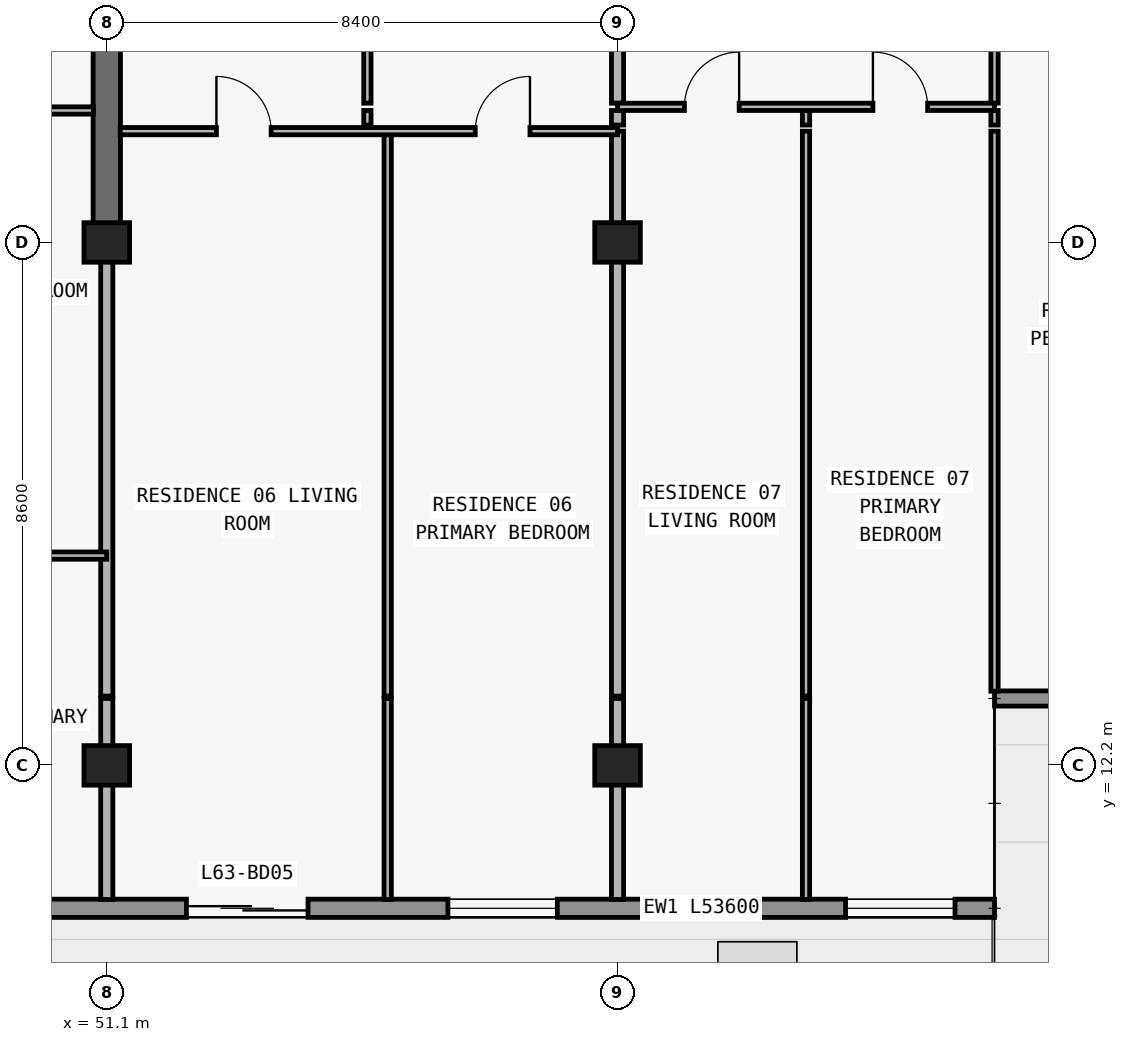
"""IFC4 building model, lengths in metres.
Left out: names, types, materials, properties, quantities, classifications, styles, units other than length and angle.
Written with IfcOpenShell. Run it as: python <this file> out.ifc"""

import sys

from ifc_helpers import new_model, si_unit, direction, frame, frame_2d, origin, origin_2d, place, context, subcontext, project, spatial, rectangle, extrude, element, fill, save


model = new_model("IFC4")
c1 = context("Model", 3, precision=1e-05, world=origin(), true_north=direction((0.0, 1.0)))
c2 = subcontext(c1, "Body", "Model", "MODEL_VIEW")
j1 = project(units=[si_unit("LENGTHUNIT", "METRE"), si_unit("PLANEANGLEUNIT", "RADIAN")], contexts=[c1])
p1 = place(None, origin())
s1 = spatial("IfcSite", under=j1, at=p1, CompositionType="ELEMENT")
p2 = place(p1, origin())
s2 = spatial("IfcBuilding", under=s1, at=p2, CompositionType="ELEMENT")
p3 = place(p2, frame((0.0, 0.0, 226.5)))
s3 = spatial("IfcBuildingStorey", under=s2, at=p3, CompositionType="ELEMENT", Elevation=226.5)
for number, where, z_axis, x_axis in (
    (1, (51.1, 12.2, 0.0), (0.0, 0.0, 1.0), (1.0, 0.0, 0.0)),
    (2, (59.5, 12.2, 0.0), (0.0, 0.0, 1.0), (1.0, 0.0, 0.0)),
    (3, (51.1, 20.8, 0.0), (0.0, 0.0, 1.0), (1.0, 0.0, 0.0)),
    (4, (59.5, 20.8, 0.0), (0.0, 0.0, 1.0), (1.0, 0.0, 0.0)),
):
    element("IfcColumn", number, at=place(p3, frame(where, z_axis=z_axis, x_axis=x_axis)), inside=s3, PredefinedType="COLUMN", context=c2, shape_type="SweptSolid", body=[
        extrude(rectangle(XDim=0.75, YDim=0.65, at=origin_2d()), origin(), (0.0, 0.0, 1.0), 3.05),
    ])
p4 = place(p3, frame((51.1, 20.8, 0.0), z_axis=(0.0, 0.0, 1.0), x_axis=(0.0, 1.0, 0.0)))
e5 = element("IfcWall", 5, at=p4, inside=s3, PredefinedType="SHEAR", context=c2, shape_type="SweptSolid", body=[
    extrude(rectangle(XDim=8.6, YDim=0.45, at=frame_2d((4.3, 0.0))), origin(), (0.0, 0.0, 1.0), 3.05),
])
p5 = place(p3, frame((65.7, 9.85, 0.0), z_axis=(0.0, 0.0, 1.0), x_axis=(-1.0, 0.0, 0.0)))
e6 = element("IfcWall", 6, at=p5, inside=s3, PredefinedType="STANDARD", context=c2, shape_type="SweptSolid", body=[
    extrude(rectangle(XDim=53.6, YDim=0.3, at=frame_2d((26.8, 0.0))), origin(), (0.0, 0.0, 1.0), 3.05),
])
p6 = place(p5, frame((48.05, 0.0, 0.85)))
e7 = element("IfcOpeningElement", 7, at=p6, cuts=e6, PredefinedType="OPENING", context=c2, shape_type="SweptSolid", body=[
    extrude(rectangle(XDim=1.8, YDim=1.55, at=frame_2d((0.9, 0.775))), frame((0.0, 0.16, 0.0), z_axis=(0.0, -1.0, 0.0), x_axis=(1.0, 0.0, 0.0)), (0.0, 0.0, 1.0), 0.32),
])
p7 = place(p5, frame((44.09, 0.0, 0.0)))
e8 = element("IfcOpeningElement", 8, at=p7, cuts=e6, PredefinedType="OPENING", context=c2, shape_type="SweptSolid", body=[
    extrude(rectangle(XDim=2.0, YDim=2.3, at=frame_2d((1.0, 1.15))), frame((0.0, 0.16, 0.0), z_axis=(0.0, -1.0, 0.0), x_axis=(1.0, 0.0, 0.0)), (0.0, 0.0, 1.0), 0.32),
])
p8 = place(p5, frame((39.99, 0.0, 0.85)))
e9 = element("IfcOpeningElement", 9, at=p8, cuts=e6, PredefinedType="OPENING", context=c2, shape_type="SweptSolid", body=[
    extrude(rectangle(XDim=1.8, YDim=1.55, at=frame_2d((0.9, 0.775))), frame((0.0, 0.16, 0.0), z_axis=(0.0, -1.0, 0.0), x_axis=(1.0, 0.0, 0.0)), (0.0, 0.0, 1.0), 0.32),
])
p9 = place(p5, frame((36.026, 0.0, 0.0)))
e10 = element("IfcOpeningElement", 10, at=p9, cuts=e6, PredefinedType="OPENING", context=c2, shape_type="SweptSolid", body=[
    extrude(rectangle(XDim=2.0, YDim=2.3, at=frame_2d((1.0, 1.15))), frame((0.0, 0.16, 0.0), z_axis=(0.0, -1.0, 0.0), x_axis=(1.0, 0.0, 0.0)), (0.0, 0.0, 1.0), 0.32),
])
p10 = place(p5, frame((31.726, 0.0, 0.85)))
e11 = element("IfcOpeningElement", 11, at=p10, cuts=e6, PredefinedType="OPENING", context=c2, shape_type="SweptSolid", body=[
    extrude(rectangle(XDim=2.2, YDim=1.55, at=frame_2d((1.1, 0.775))), frame((0.0, 0.16, 0.0), z_axis=(0.0, -1.0, 0.0), x_axis=(1.0, 0.0, 0.0)), (0.0, 0.0, 1.0), 0.32),
])
p11 = place(p5, frame((27.51, 0.0, 0.0)))
e12 = element("IfcOpeningElement", 12, at=p11, cuts=e6, PredefinedType="OPENING", context=c2, shape_type="SweptSolid", body=[
    extrude(rectangle(XDim=2.0, YDim=2.3, at=frame_2d((1.0, 1.15))), frame((0.0, 0.16, 0.0), z_axis=(0.0, -1.0, 0.0), x_axis=(1.0, 0.0, 0.0)), (0.0, 0.0, 1.0), 0.32),
])
p12 = place(p5, frame((23.81, 0.0, 0.85)))
e13 = element("IfcOpeningElement", 13, at=p12, cuts=e6, PredefinedType="OPENING", context=c2, shape_type="SweptSolid", body=[
    extrude(rectangle(XDim=1.8, YDim=1.55, at=frame_2d((0.9, 0.775))), frame((0.0, 0.16, 0.0), z_axis=(0.0, -1.0, 0.0), x_axis=(1.0, 0.0, 0.0)), (0.0, 0.0, 1.0), 0.32),
])
p13 = place(p5, frame((20.026, 0.0, 0.0)))
e14 = element("IfcOpeningElement", 14, at=p13, cuts=e6, PredefinedType="OPENING", context=c2, shape_type="SweptSolid", body=[
    extrude(rectangle(XDim=2.0, YDim=2.3, at=frame_2d((1.0, 1.15))), frame((0.0, 0.16, 0.0), z_axis=(0.0, -1.0, 0.0), x_axis=(1.0, 0.0, 0.0)), (0.0, 0.0, 1.0), 0.32),
])
p14 = place(p5, frame((15.726, 0.0, 0.85)))
e15 = element("IfcOpeningElement", 15, at=p14, cuts=e6, PredefinedType="OPENING", context=c2, shape_type="SweptSolid", body=[
    extrude(rectangle(XDim=2.2, YDim=1.55, at=frame_2d((1.1, 0.775))), frame((0.0, 0.16, 0.0), z_axis=(0.0, -1.0, 0.0), x_axis=(1.0, 0.0, 0.0)), (0.0, 0.0, 1.0), 0.32),
])
p15 = place(p5, frame((11.29, 0.0, 0.0)))
e16 = element("IfcOpeningElement", 16, at=p15, cuts=e6, PredefinedType="OPENING", context=c2, shape_type="SweptSolid", body=[
    extrude(rectangle(XDim=2.0, YDim=2.3, at=frame_2d((1.0, 1.15))), frame((0.0, 0.16, 0.0), z_axis=(0.0, -1.0, 0.0), x_axis=(1.0, 0.0, 0.0)), (0.0, 0.0, 1.0), 0.32),
])
p16 = place(p5, frame((7.19, 0.0, 0.85)))
e17 = element("IfcOpeningElement", 17, at=p16, cuts=e6, PredefinedType="OPENING", context=c2, shape_type="SweptSolid", body=[
    extrude(rectangle(XDim=1.8, YDim=1.55, at=frame_2d((0.9, 0.775))), frame((0.0, 0.16, 0.0), z_axis=(0.0, -1.0, 0.0), x_axis=(1.0, 0.0, 0.0)), (0.0, 0.0, 1.0), 0.32),
])
p17 = place(p5, frame((0.65, 0.0, 0.85)))
e18 = element("IfcOpeningElement", 18, at=p17, cuts=e6, PredefinedType="OPENING", context=c2, shape_type="SweptSolid", body=[
    extrude(rectangle(XDim=1.8, YDim=1.55, at=frame_2d((0.9, 0.775))), frame((0.0, 0.16, 0.0), z_axis=(0.0, -1.0, 0.0), x_axis=(1.0, 0.0, 0.0)), (0.0, 0.0, 1.0), 0.32),
])
p18 = place(p3, frame((65.7, 13.3, 0.0), z_axis=(0.0, 0.0, 1.0), x_axis=(1.0, 0.0, 0.0)))
e19 = element("IfcWall", 19, at=p18, inside=s3, PredefinedType="ELEMENTEDWALL", context=c2, shape_type="SweptSolid", body=[
    extrude(rectangle(XDim=3.85, YDim=0.25, at=frame_2d((1.925, 0.0))), origin(), (0.0, 0.0, 1.0), 3.05),
])
p19 = place(p3, frame((51.1, 9.995, 0.0), z_axis=(0.0, 0.0, 1.0), x_axis=(0.0, 1.0, 0.0)))
e20 = element("IfcWall", 20, at=p19, inside=s3, PredefinedType="PARTITIONING", context=c2, shape_type="SweptSolid", body=[
    extrude(rectangle(XDim=3.305, YDim=0.2, at=frame_2d((1.652, 0.0))), origin(), (0.0, 0.0, 1.0), 2.263),
])
p20 = place(p3, frame((51.1, 13.34, 0.0), z_axis=(0.0, 0.0, 1.0), x_axis=(0.0, 1.0, 0.0)))
e21 = element("IfcWall", 21, at=p20, inside=s3, PredefinedType="PARTITIONING", context=c2, shape_type="SweptSolid", body=[
    extrude(rectangle(XDim=7.455, YDim=0.2, at=frame_2d((3.728, 0.0))), origin(), (0.0, 0.0, 1.0), 2.263),
])
p21 = place(p3, frame((55.386, 22.73, 0.0), z_axis=(0.0, 0.0, 1.0), x_axis=(0.0, 1.0, 0.0)))
e22 = element("IfcWall", 22, at=p21, inside=s3, PredefinedType="PARTITIONING", context=c2, shape_type="SweptSolid", body=[
    extrude(rectangle(XDim=0.24, YDim=0.12, at=frame_2d((0.12, 0.0))), origin(), (0.0, 0.0, 1.0), 2.629),
])
p22 = place(p3, frame((55.386, 23.09, 0.0), z_axis=(0.0, 0.0, 1.0), x_axis=(0.0, 1.0, 0.0)))
e23 = element("IfcWall", 23, at=p22, inside=s3, PredefinedType="PARTITIONING", context=c2, shape_type="SweptSolid", body=[
    extrude(rectangle(XDim=4.69, YDim=0.12, at=frame_2d((2.345, 0.0))), origin(), (0.0, 0.0, 1.0), 2.629),
])
p23 = place(p22, frame((1.895, 0.0, 0.0)))
e24 = element("IfcOpeningElement", 24, at=p23, cuts=e23, PredefinedType="OPENING", context=c2, shape_type="SweptSolid", body=[
    extrude(rectangle(XDim=0.9, YDim=2.15, at=frame_2d((0.45, 1.075))), frame((0.0, 0.07, 0.0), z_axis=(0.0, -1.0, 0.0), x_axis=(1.0, 0.0, 0.0)), (0.0, 0.0, 1.0), 0.14),
])
p24 = place(p3, frame((55.72, 9.995, 0.0), z_axis=(0.0, 0.0, 1.0), x_axis=(0.0, 1.0, 0.0)))
e25 = element("IfcWall", 25, at=p24, inside=s3, PredefinedType="PARTITIONING", context=c2, shape_type="SweptSolid", body=[
    extrude(rectangle(XDim=3.305, YDim=0.12, at=frame_2d((1.652, 0.0))), origin(), (0.0, 0.0, 1.0), 3.05),
])
p25 = place(p3, frame((55.72, 13.34, 0.0), z_axis=(0.0, 0.0, 1.0), x_axis=(0.0, 1.0, 0.0)))
e26 = element("IfcWall", 26, at=p25, inside=s3, PredefinedType="PARTITIONING", context=c2, shape_type="SweptSolid", body=[
    extrude(rectangle(XDim=9.29, YDim=0.12, at=frame_2d((4.645, 0.0))), origin(), (0.0, 0.0, 1.0), 3.05),
])
p26 = place(p3, frame((59.5, 9.995, 0.0), z_axis=(0.0, 0.0, 1.0), x_axis=(0.0, 1.0, 0.0)))
e27 = element("IfcWall", 27, at=p26, inside=s3, PredefinedType="PARTITIONING", context=c2, shape_type="SweptSolid", body=[
    extrude(rectangle(XDim=3.305, YDim=0.2, at=frame_2d((1.652, 0.0))), origin(), (0.0, 0.0, 1.0), 2.263),
])
p27 = place(p3, frame((59.5, 13.34, 0.0), z_axis=(0.0, 0.0, 1.0), x_axis=(0.0, 1.0, 0.0)))
e28 = element("IfcWall", 28, at=p27, inside=s3, PredefinedType="PARTITIONING", context=c2, shape_type="SweptSolid", body=[
    extrude(rectangle(XDim=9.29, YDim=0.2, at=frame_2d((4.645, 0.0))), origin(), (0.0, 0.0, 1.0), 2.263),
])
p28 = place(p3, frame((59.5, 22.73, 0.0), z_axis=(0.0, 0.0, 1.0), x_axis=(0.0, 1.0, 0.0)))
e29 = element("IfcWall", 29, at=p28, inside=s3, PredefinedType="PARTITIONING", context=c2, shape_type="SweptSolid", body=[
    extrude(rectangle(XDim=0.24, YDim=0.2, at=frame_2d((0.12, 0.0))), origin(), (0.0, 0.0, 1.0), 2.263),
])
p29 = place(p3, frame((59.5, 23.09, 0.0), z_axis=(0.0, 0.0, 1.0), x_axis=(0.0, 1.0, 0.0)))
e30 = element("IfcWall", 30, at=p29, inside=s3, PredefinedType="PARTITIONING", context=c2, shape_type="SweptSolid", body=[
    extrude(rectangle(XDim=4.69, YDim=0.2, at=frame_2d((2.345, 0.0))), origin(), (0.0, 0.0, 1.0), 2.263),
])
p30 = place(p3, frame((62.6, 9.995, 0.0), z_axis=(0.0, 0.0, 1.0), x_axis=(0.0, 1.0, 0.0)))
e31 = element("IfcWall", 31, at=p30, inside=s3, PredefinedType="PARTITIONING", context=c2, shape_type="SweptSolid", body=[
    extrude(rectangle(XDim=3.305, YDim=0.12, at=frame_2d((1.652, 0.0))), origin(), (0.0, 0.0, 1.0), 3.05),
])
p31 = place(p3, frame((62.6, 13.34, 0.0), z_axis=(0.0, 0.0, 1.0), x_axis=(0.0, 1.0, 0.0)))
e32 = element("IfcWall", 32, at=p31, inside=s3, PredefinedType="PARTITIONING", context=c2, shape_type="SweptSolid", body=[
    extrude(rectangle(XDim=9.29, YDim=0.12, at=frame_2d((4.645, 0.0))), origin(), (0.0, 0.0, 1.0), 3.05),
])
p32 = place(p3, frame((62.6, 22.73, 0.0), z_axis=(0.0, 0.0, 1.0), x_axis=(0.0, 1.0, 0.0)))
e33 = element("IfcWall", 33, at=p32, inside=s3, PredefinedType="PARTITIONING", context=c2, shape_type="SweptSolid", body=[
    extrude(rectangle(XDim=0.24, YDim=0.12, at=frame_2d((0.12, 0.0))), origin(), (0.0, 0.0, 1.0), 3.05),
])
p33 = place(p3, frame((65.7, 13.42, 0.0), z_axis=(0.0, 0.0, 1.0), x_axis=(0.0, 1.0, 0.0)))
e34 = element("IfcWall", 34, at=p33, inside=s3, PredefinedType="PARTITIONING", context=c2, shape_type="SweptSolid", body=[
    extrude(rectangle(XDim=9.21, YDim=0.12, at=frame_2d((4.605, 0.0))), origin(), (0.0, 0.0, 1.0), 3.05),
])
p34 = place(p3, frame((65.7, 22.73, 0.0), z_axis=(0.0, 0.0, 1.0), x_axis=(0.0, 1.0, 0.0)))
e35 = element("IfcWall", 35, at=p34, inside=s3, PredefinedType="PARTITIONING", context=c2, shape_type="SweptSolid", body=[
    extrude(rectangle(XDim=0.24, YDim=0.12, at=frame_2d((0.12, 0.0))), origin(), (0.0, 0.0, 1.0), 3.05),
])
p35 = place(p3, frame((65.7, 23.09, 0.0), z_axis=(0.0, 0.0, 1.0), x_axis=(0.0, 1.0, 0.0)))
e36 = element("IfcWall", 36, at=p35, inside=s3, PredefinedType="PARTITIONING", context=c2, shape_type="SweptSolid", body=[
    extrude(rectangle(XDim=4.69, YDim=0.12, at=frame_2d((2.345, 0.0))), origin(), (0.0, 0.0, 1.0), 3.05),
])
p36 = place(p35, frame((1.895, 0.0, 0.0)))
e37 = element("IfcOpeningElement", 37, at=p36, cuts=e36, PredefinedType="OPENING", context=c2, shape_type="SweptSolid", body=[
    extrude(rectangle(XDim=0.9, YDim=2.15, at=frame_2d((0.45, 1.075))), frame((0.0, 0.07, 0.0), z_axis=(0.0, -1.0, 0.0), x_axis=(1.0, 0.0, 0.0)), (0.0, 0.0, 1.0), 0.14),
])
p37 = place(p3, frame((46.648, 15.65, 0.0), z_axis=(0.0, 0.0, 1.0), x_axis=(1.0, 0.0, 0.0)))
e38 = element("IfcWall", 38, at=p37, inside=s3, PredefinedType="PARTITIONING", context=c2, shape_type="SweptSolid", body=[
    extrude(rectangle(XDim=4.452, YDim=0.12, at=frame_2d((2.226, 0.0))), origin(), (0.0, 0.0, 1.0), 3.05),
])
p38 = place(p37, frame((1.776, 0.0, 0.0)))
e39 = element("IfcOpeningElement", 39, at=p38, cuts=e38, PredefinedType="OPENING", context=c2, shape_type="SweptSolid", body=[
    extrude(rectangle(XDim=0.9, YDim=2.15, at=frame_2d((0.45, 1.075))), frame((0.0, 0.07, 0.0), z_axis=(0.0, -1.0, 0.0), x_axis=(1.0, 0.0, 0.0)), (0.0, 0.0, 1.0), 0.14),
])
p39 = place(p3, frame((51.32, 22.63, 0.0), z_axis=(0.0, 0.0, 1.0), x_axis=(1.0, 0.0, 0.0)))
e40 = element("IfcWall", 40, at=p39, inside=s3, PredefinedType="PARTITIONING", context=c2, shape_type="SweptSolid", body=[
    extrude(rectangle(XDim=8.18, YDim=0.12, at=frame_2d((4.09, 0.0))), origin(), (0.0, 0.0, 1.0), 3.05),
])
p40 = place(p39, frame((1.583, 0.0, 0.0)))
e41 = element("IfcOpeningElement", 41, at=p40, cuts=e40, PredefinedType="OPENING", context=c2, shape_type="SweptSolid", body=[
    extrude(rectangle(XDim=0.9, YDim=2.15, at=frame_2d((0.45, 1.075))), frame((0.0, 0.07, 0.0), z_axis=(0.0, -1.0, 0.0), x_axis=(1.0, 0.0, 0.0)), (0.0, 0.0, 1.0), 0.14),
])
p41 = place(p39, frame((5.84, 0.0, 0.0)))
e42 = element("IfcOpeningElement", 42, at=p41, cuts=e40, PredefinedType="OPENING", context=c2, shape_type="SweptSolid", body=[
    extrude(rectangle(XDim=0.9, YDim=2.15, at=frame_2d((0.45, 1.075))), frame((0.0, 0.07, 0.0), z_axis=(0.0, -1.0, 0.0), x_axis=(1.0, 0.0, 0.0)), (0.0, 0.0, 1.0), 0.14),
])
p42 = place(p3, frame((42.7, 22.97, 0.0), z_axis=(0.0, 0.0, 1.0), x_axis=(1.0, 0.0, 0.0)))
e43 = element("IfcWall", 43, at=p42, inside=s3, PredefinedType="PARTITIONING", context=c2, shape_type="SweptSolid", body=[
    extrude(rectangle(XDim=8.18, YDim=0.12, at=frame_2d((4.09, 0.0))), origin(), (0.0, 0.0, 1.0), 3.05),
])
p43 = place(p42, frame((1.524, 0.0, 0.0)))
e44 = element("IfcOpeningElement", 44, at=p43, cuts=e43, PredefinedType="OPENING", context=c2, shape_type="SweptSolid", body=[
    extrude(rectangle(XDim=0.9, YDim=2.15, at=frame_2d((0.45, 1.075))), frame((0.0, 0.07, 0.0), z_axis=(0.0, -1.0, 0.0), x_axis=(1.0, 0.0, 0.0)), (0.0, 0.0, 1.0), 0.14),
])
p44 = place(p42, frame((6.033, 0.0, 0.0)))
e45 = element("IfcOpeningElement", 45, at=p44, cuts=e43, PredefinedType="OPENING", context=c2, shape_type="SweptSolid", body=[
    extrude(rectangle(XDim=0.9, YDim=2.15, at=frame_2d((0.45, 1.075))), frame((0.0, 0.07, 0.0), z_axis=(0.0, -1.0, 0.0), x_axis=(1.0, 0.0, 0.0)), (0.0, 0.0, 1.0), 0.14),
])
p45 = place(p3, frame((59.5, 23.03, 0.0), z_axis=(0.0, 0.0, 1.0), x_axis=(1.0, 0.0, 0.0)))
e46 = element("IfcWall", 46, at=p45, inside=s3, PredefinedType="PARTITIONING", context=c2, shape_type="SweptSolid", body=[
    extrude(rectangle(XDim=6.2, YDim=0.12, at=frame_2d((3.1, 0.0))), origin(), (0.0, 0.0, 1.0), 3.05),
])
p46 = place(p45, frame((1.1, 0.0, 0.0)))
e47 = element("IfcOpeningElement", 47, at=p46, cuts=e46, PredefinedType="OPENING", context=c2, shape_type="SweptSolid", body=[
    extrude(rectangle(XDim=0.9, YDim=2.15, at=frame_2d((0.45, 1.075))), frame((0.0, 0.07, 0.0), z_axis=(0.0, -1.0, 0.0), x_axis=(1.0, 0.0, 0.0)), (0.0, 0.0, 1.0), 0.14),
])
p47 = place(p45, frame((4.2, 0.0, 0.0)))
e48 = element("IfcOpeningElement", 48, at=p47, cuts=e46, PredefinedType="OPENING", context=c2, shape_type="SweptSolid", body=[
    extrude(rectangle(XDim=0.9, YDim=2.15, at=frame_2d((0.45, 1.075))), frame((0.0, 0.07, 0.0), z_axis=(0.0, -1.0, 0.0), x_axis=(1.0, 0.0, 0.0)), (0.0, 0.0, 1.0), 0.14),
])
p48 = place(p15, origin())
e49 = element("IfcDoor", 49, at=p48, inside=s3, OperationType="DOUBLE_DOOR_SLIDING", PredefinedType="DOOR", context=c2, shape_type="SweptSolid", body=[
    extrude(rectangle(XDim=2.0, YDim=2.3, at=frame_2d((1.0, 1.15))), frame((0.0, 0.025, 0.0), z_axis=(0.0, -1.0, 0.0), x_axis=(1.0, 0.0, 0.0)), (0.0, 0.0, 1.0), 0.05),
])
fill(e16, e49)
p49 = place(p16, origin())
e50 = element("IfcWindow", 50, at=p49, inside=s3, PartitioningType="SINGLE_PANEL", PredefinedType="WINDOW", context=c2, shape_type="SweptSolid", body=[
    extrude(rectangle(XDim=1.8, YDim=1.55, at=frame_2d((0.9, 0.775))), frame((0.0, 0.03, 0.0), z_axis=(0.0, -1.0, 0.0), x_axis=(1.0, 0.0, 0.0)), (0.0, 0.0, 1.0), 0.06),
])
fill(e17, e50)
p50 = place(p17, origin())
e51 = element("IfcWindow", 51, at=p50, inside=s3, PartitioningType="SINGLE_PANEL", PredefinedType="WINDOW", context=c2, shape_type="SweptSolid", body=[
    extrude(rectangle(XDim=1.8, YDim=1.55, at=frame_2d((0.9, 0.775))), frame((0.0, 0.03, 0.0), z_axis=(0.0, -1.0, 0.0), x_axis=(1.0, 0.0, 0.0)), (0.0, 0.0, 1.0), 0.06),
])
fill(e18, e51)
p51 = place(p40, origin())
e52 = element("IfcDoor", 52, at=p51, inside=s3, OperationType="SINGLE_SWING_LEFT", PredefinedType="DOOR", context=c2, shape_type="SweptSolid", body=[
    extrude(rectangle(XDim=0.9, YDim=2.15, at=frame_2d((0.45, 1.075))), frame((0.0, 0.025, 0.0), z_axis=(0.0, -1.0, 0.0), x_axis=(1.0, 0.0, 0.0)), (0.0, 0.0, 1.0), 0.05),
])
fill(e41, e52)
p52 = place(p41, origin())
e53 = element("IfcDoor", 53, at=p52, inside=s3, OperationType="SINGLE_SWING_RIGHT", PredefinedType="DOOR", context=c2, shape_type="SweptSolid", body=[
    extrude(rectangle(XDim=0.9, YDim=2.15, at=frame_2d((0.45, 1.075))), frame((0.0, 0.025, 0.0), z_axis=(0.0, -1.0, 0.0), x_axis=(1.0, 0.0, 0.0)), (0.0, 0.0, 1.0), 0.05),
])
fill(e42, e53)
p53 = place(p46, origin())
e54 = element("IfcDoor", 54, at=p53, inside=s3, OperationType="SINGLE_SWING_RIGHT", PredefinedType="DOOR", context=c2, shape_type="SweptSolid", body=[
    extrude(rectangle(XDim=0.9, YDim=2.15, at=frame_2d((0.45, 1.075))), frame((0.0, 0.025, 0.0), z_axis=(0.0, -1.0, 0.0), x_axis=(1.0, 0.0, 0.0)), (0.0, 0.0, 1.0), 0.05),
])
fill(e47, e54)
p54 = place(p47, origin())
e55 = element("IfcDoor", 55, at=p54, inside=s3, OperationType="SINGLE_SWING_LEFT", PredefinedType="DOOR", context=c2, shape_type="SweptSolid", body=[
    extrude(rectangle(XDim=0.9, YDim=2.15, at=frame_2d((0.45, 1.075))), frame((0.0, 0.025, 0.0), z_axis=(0.0, -1.0, 0.0), x_axis=(1.0, 0.0, 0.0)), (0.0, 0.0, 1.0), 0.05),
])
fill(e48, e55)
save(model, sys.argv[1])
